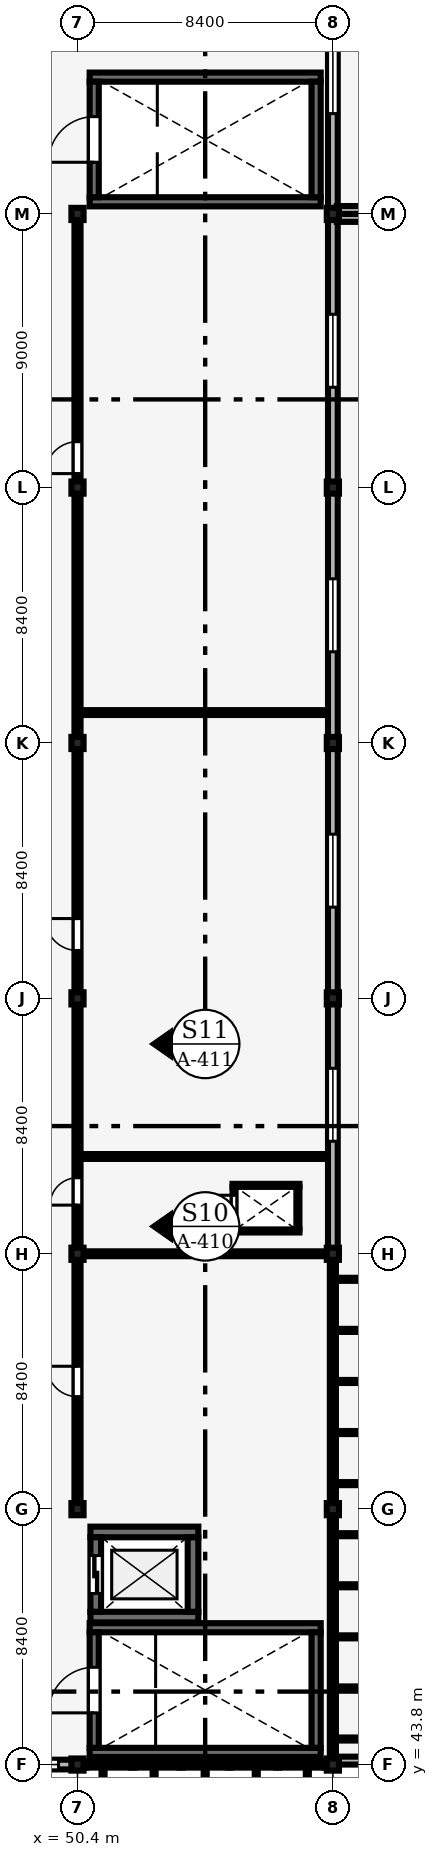
"""IFC4 building model, lengths in metres.
Left out: names, types, materials, properties, quantities, classifications, styles, units other than length and angle.
Written with IfcOpenShell. Run it as: python <this file> out.ifc"""

import sys

from ifc_helpers import new_model, si_unit, direction, frame, frame_2d, origin, origin_2d, place, context, subcontext, project, spatial, rectangle, extrude, element, fill, save


model = new_model("IFC4")
c1 = context("Model", 3, precision=1e-05, world=origin(), true_north=direction((0.0, 1.0)))
c2 = subcontext(c1, "Body", "Model", "MODEL_VIEW")
j1 = project(units=[si_unit("LENGTHUNIT", "METRE"), si_unit("PLANEANGLEUNIT", "RADIAN")], contexts=[c1])
p1 = place(None, origin())
s1 = spatial("IfcSite", under=j1, at=p1, CompositionType="ELEMENT")
p2 = place(p1, origin())
s2 = spatial("IfcBuilding", under=s1, at=p2, CompositionType="ELEMENT")
p3 = place(p2, frame((0.0, 0.0, 21.6)))
s3 = spatial("IfcBuildingStorey", under=s2, at=p3, CompositionType="ELEMENT", Elevation=21.6)
for number, where, z_axis, x_axis in (
    (1, (50.4, 43.8, 0.0), (0.0, 0.0, 1.0), (1.0, 0.0, 0.0)),
    (2, (50.4, 52.2, 0.0), (0.0, 0.0, 1.0), (1.0, 0.0, 0.0)),
    (3, (50.4, 60.6, 0.0), (0.0, 0.0, 1.0), (1.0, 0.0, 0.0)),
    (4, (50.4, 69.0, 0.0), (0.0, 0.0, 1.0), (1.0, 0.0, 0.0)),
    (5, (50.4, 77.4, 0.0), (0.0, 0.0, 1.0), (1.0, 0.0, 0.0)),
    (6, (50.4, 85.8, 0.0), (0.0, 0.0, 1.0), (1.0, 0.0, 0.0)),
    (7, (50.4, 94.8, 0.0), (0.0, 0.0, 1.0), (1.0, 0.0, 0.0)),
    (8, (58.8, 43.8, 0.0), (0.0, 0.0, 1.0), (1.0, 0.0, 0.0)),
    (9, (58.8, 52.2, 0.0), (0.0, 0.0, 1.0), (1.0, 0.0, 0.0)),
    (10, (58.8, 60.6, 0.0), (0.0, 0.0, 1.0), (1.0, 0.0, 0.0)),
    (11, (58.8, 69.0, 0.0), (0.0, 0.0, 1.0), (1.0, 0.0, 0.0)),
    (12, (58.8, 77.4, 0.0), (0.0, 0.0, 1.0), (1.0, 0.0, 0.0)),
    (13, (58.8, 85.8, 0.0), (0.0, 0.0, 1.0), (1.0, 0.0, 0.0)),
    (14, (58.8, 94.8, 0.0), (0.0, 0.0, 1.0), (1.0, 0.0, 0.0)),
):
    element("IfcColumn", number, at=place(p3, frame(where, z_axis=z_axis, x_axis=x_axis)), inside=s3, PredefinedType="COLUMN", context=c2, shape_type="SweptSolid", body=[
        extrude(rectangle(XDim=0.4, YDim=0.4, at=origin_2d()), origin(), (0.0, 0.0, 1.0), 4.2),
    ])
p4 = place(p3, frame((42.175, 43.8, 0.0), z_axis=(0.0, 0.0, 1.0), x_axis=(1.0, 0.0, 0.0)))
e15 = element("IfcWall", 15, at=p4, inside=s3, PredefinedType="SOLIDWALL", context=c2, shape_type="SweptSolid", body=[
    extrude(rectangle(XDim=8.05, YDim=0.32, at=frame_2d((4.025, 0.0))), origin(), (0.0, 0.0, 1.0), 3.48),
])
p5 = place(p4, frame((0.45, 0.0, 0.9)))
e16 = element("IfcOpeningElement", 16, at=p5, cuts=e15, PredefinedType="OPENING", context=c2, shape_type="SweptSolid", body=[
    extrude(rectangle(XDim=1.2, YDim=1.5, at=frame_2d((0.6, 0.75))), frame((0.0, 0.17, 0.0), z_axis=(0.0, -1.0, 0.0), x_axis=(1.0, 0.0, 0.0)), (0.0, 0.0, 1.0), 0.34),
])
p6 = place(p4, frame((6.4, 0.0, 0.9)))
e17 = element("IfcOpeningElement", 17, at=p6, cuts=e15, PredefinedType="OPENING", context=c2, shape_type="SweptSolid", body=[
    extrude(rectangle(XDim=1.2, YDim=1.8, at=frame_2d((0.6, 0.9))), frame((0.0, 0.17, 0.0), z_axis=(0.0, -1.0, 0.0), x_axis=(1.0, 0.0, 0.0)), (0.0, 0.0, 1.0), 0.34),
])
p7 = place(p3, frame((58.8, 60.775, 0.0), z_axis=(0.0, 0.0, 1.0), x_axis=(0.0, 1.0, 0.0)))
e18 = element("IfcWall", 18, at=p7, inside=s3, PredefinedType="SOLIDWALL", context=c2, shape_type="SweptSolid", body=[
    extrude(rectangle(XDim=8.05, YDim=0.32, at=frame_2d((4.025, 0.0))), origin(), (0.0, 0.0, 1.0), 3.48),
])
p8 = place(p7, frame((3.525, 0.0, 0.9)))
e19 = element("IfcOpeningElement", 19, at=p8, cuts=e18, PredefinedType="OPENING", context=c2, shape_type="SweptSolid", body=[
    extrude(rectangle(XDim=2.4, YDim=1.8, at=frame_2d((1.2, 0.9))), frame((0.0, 0.17, 0.0), z_axis=(0.0, -1.0, 0.0), x_axis=(1.0, 0.0, 0.0)), (0.0, 0.0, 1.0), 0.34),
])
p9 = place(p3, frame((58.8, 69.175, 0.0), z_axis=(0.0, 0.0, 1.0), x_axis=(0.0, 1.0, 0.0)))
e20 = element("IfcWall", 20, at=p9, inside=s3, PredefinedType="SOLIDWALL", context=c2, shape_type="SweptSolid", body=[
    extrude(rectangle(XDim=8.05, YDim=0.32, at=frame_2d((4.025, 0.0))), origin(), (0.0, 0.0, 1.0), 3.43),
])
p10 = place(p9, frame((2.825, 0.0, 0.9)))
e21 = element("IfcOpeningElement", 21, at=p10, cuts=e20, PredefinedType="OPENING", context=c2, shape_type="SweptSolid", body=[
    extrude(rectangle(XDim=2.4, YDim=1.8, at=frame_2d((1.2, 0.9))), frame((0.0, 0.17, 0.0), z_axis=(0.0, -1.0, 0.0), x_axis=(1.0, 0.0, 0.0)), (0.0, 0.0, 1.0), 0.34),
])
p11 = place(p3, frame((58.8, 77.575, 0.0), z_axis=(0.0, 0.0, 1.0), x_axis=(0.0, 1.0, 0.0)))
e22 = element("IfcWall", 22, at=p11, inside=s3, PredefinedType="SOLIDWALL", context=c2, shape_type="SweptSolid", body=[
    extrude(rectangle(XDim=8.05, YDim=0.32, at=frame_2d((4.025, 0.0))), origin(), (0.0, 0.0, 1.0), 3.48),
])
p12 = place(p11, frame((2.825, 0.0, 0.9)))
e23 = element("IfcOpeningElement", 23, at=p12, cuts=e22, PredefinedType="OPENING", context=c2, shape_type="SweptSolid", body=[
    extrude(rectangle(XDim=2.4, YDim=1.8, at=frame_2d((1.2, 0.9))), frame((0.0, 0.17, 0.0), z_axis=(0.0, -1.0, 0.0), x_axis=(1.0, 0.0, 0.0)), (0.0, 0.0, 1.0), 0.34),
])
p13 = place(p3, frame((58.8, 85.975, 0.0), z_axis=(0.0, 0.0, 1.0), x_axis=(0.0, 1.0, 0.0)))
e24 = element("IfcWall", 24, at=p13, inside=s3, PredefinedType="SOLIDWALL", context=c2, shape_type="SweptSolid", body=[
    extrude(rectangle(XDim=8.65, YDim=0.32, at=frame_2d((4.325, 0.0))), origin(), (0.0, 0.0, 1.0), 3.43),
])
p14 = place(p13, frame((3.125, 0.0, 0.9)))
e25 = element("IfcOpeningElement", 25, at=p14, cuts=e24, PredefinedType="OPENING", context=c2, shape_type="SweptSolid", body=[
    extrude(rectangle(XDim=2.4, YDim=1.8, at=frame_2d((1.2, 0.9))), frame((0.0, 0.17, 0.0), z_axis=(0.0, -1.0, 0.0), x_axis=(1.0, 0.0, 0.0)), (0.0, 0.0, 1.0), 0.34),
])
p15 = place(p3, frame((58.8, 94.975, 0.0), z_axis=(0.0, 0.0, 1.0), x_axis=(0.0, 1.0, 0.0)))
e26 = element("IfcWall", 26, at=p15, inside=s3, PredefinedType="SOLIDWALL", context=c2, shape_type="SweptSolid", body=[
    extrude(rectangle(XDim=8.65, YDim=0.32, at=frame_2d((4.325, 0.0))), origin(), (0.0, 0.0, 1.0), 3.48),
])
p16 = place(p15, frame((3.125, 0.0, 0.9)))
e27 = element("IfcOpeningElement", 27, at=p16, cuts=e26, PredefinedType="OPENING", context=c2, shape_type="SweptSolid", body=[
    extrude(rectangle(XDim=2.4, YDim=1.8, at=frame_2d((1.2, 0.9))), frame((0.0, 0.17, 0.0), z_axis=(0.0, -1.0, 0.0), x_axis=(1.0, 0.0, 0.0)), (0.0, 0.0, 1.0), 0.34),
])
for number, where, z_axis, x_axis in (
    (28, (58.93, 43.93, 0.0), (0.0, 0.0, 1.0), (1.0, 0.0, 0.0)),
    (29, (58.93, 94.67, 0.0), (0.0, 0.0, 1.0), (1.0, 0.0, 0.0)),
):
    element("IfcWall", number, at=place(p3, frame(where, z_axis=z_axis, x_axis=x_axis)), inside=s3, PredefinedType="PARAPET", context=c2, shape_type="SweptSolid", body=[
        extrude(rectangle(XDim=8.14, YDim=0.26, at=frame_2d((4.07, 0.0))), origin(), (0.0, 0.0, 1.0), 0.85),
    ])
p17 = place(p3, frame((58.93, 94.93, 0.0), z_axis=(0.0, 0.0, 1.0), x_axis=(1.0, 0.0, 0.0)))
e30 = element("IfcWall", 30, at=p17, inside=s3, PredefinedType="PARAPET", context=c2, shape_type="SweptSolid", body=[
    extrude(rectangle(XDim=24.94, YDim=0.26, at=frame_2d((12.47, 0.0))), origin(), (0.0, 0.0, 1.0), 0.85),
])
for number, where, z_axis, x_axis in (
    (31, (50.8, 44.2, 0.0), (0.0, 0.0, 1.0), (1.0, 0.0, 0.0)),
    (32, (50.8, 48.3, 0.0), (0.0, 0.0, 1.0), (1.0, 0.0, 0.0)),
):
    element("IfcWall", number, at=place(p3, frame(where, z_axis=z_axis, x_axis=x_axis)), inside=s3, PredefinedType="SHEAR", context=c2, shape_type="SweptSolid", body=[
        extrude(rectangle(XDim=7.6, YDim=0.3, at=frame_2d((3.8, 0.0))), origin(), (0.0, 0.0, 1.0), 4.025),
    ])
p18 = place(p3, frame((50.95, 44.35, 0.0), z_axis=(0.0, 0.0, 1.0), x_axis=(0.0, 1.0, 0.0)))
e33 = element("IfcWall", 33, at=p18, inside=s3, PredefinedType="SHEAR", context=c2, shape_type="SweptSolid", body=[
    extrude(rectangle(XDim=3.8, YDim=0.3, at=frame_2d((1.9, 0.0))), origin(), (0.0, 0.0, 1.0), 4.025),
])
p19 = place(p18, frame((1.15, 0.0, 0.0)))
e34 = element("IfcOpeningElement", 34, at=p19, cuts=e33, PredefinedType="OPENING", context=c2, shape_type="SweptSolid", body=[
    extrude(rectangle(XDim=1.5, YDim=2.2, at=frame_2d((0.75, 1.1))), frame((0.0, 0.16, 0.0), z_axis=(0.0, -1.0, 0.0), x_axis=(1.0, 0.0, 0.0)), (0.0, 0.0, 1.0), 0.32),
])
p20 = place(p3, frame((58.25, 44.35, 0.0), z_axis=(0.0, 0.0, 1.0), x_axis=(0.0, 1.0, 0.0)))
e35 = element("IfcWall", 35, at=p20, inside=s3, PredefinedType="SHEAR", context=c2, shape_type="SweptSolid", body=[
    extrude(rectangle(XDim=3.8, YDim=0.3, at=frame_2d((1.9, 0.0))), origin(), (0.0, 0.0, 1.0), 4.025),
])
for number, where, z_axis, x_axis in (
    (36, (50.825, 48.65, 0.0), (0.0, 0.0, 1.0), (1.0, 0.0, 0.0)),
    (37, (50.825, 51.45, 0.0), (0.0, 0.0, 1.0), (1.0, 0.0, 0.0)),
):
    element("IfcWall", number, at=place(p3, frame(where, z_axis=z_axis, x_axis=x_axis)), inside=s3, PredefinedType="SHEAR", context=c2, shape_type="SweptSolid", body=[
        extrude(rectangle(XDim=3.55, YDim=0.35, at=frame_2d((1.775, 0.0))), origin(), (0.0, 0.0, 1.0), 3.92),
    ])
p21 = place(p3, frame((51.0, 48.825, 0.0), z_axis=(0.0, 0.0, 1.0), x_axis=(0.0, 1.0, 0.0)))
e38 = element("IfcWall", 38, at=p21, inside=s3, PredefinedType="SHEAR", context=c2, shape_type="SweptSolid", body=[
    extrude(rectangle(XDim=2.45, YDim=0.35, at=frame_2d((1.225, 0.0))), origin(), (0.0, 0.0, 1.0), 3.92),
])
p22 = place(p21, frame((0.6, 0.0, 0.0)))
e39 = element("IfcOpeningElement", 39, at=p22, cuts=e38, PredefinedType="OPENING", context=c2, shape_type="SweptSolid", body=[
    extrude(rectangle(XDim=1.25, YDim=2.25, at=frame_2d((0.625, 1.125))), frame((0.0, 0.185, 0.0), z_axis=(0.0, -1.0, 0.0), x_axis=(1.0, 0.0, 0.0)), (0.0, 0.0, 1.0), 0.37),
])
p23 = place(p3, frame((54.2, 48.825, 0.0), z_axis=(0.0, 0.0, 1.0), x_axis=(0.0, 1.0, 0.0)))
e40 = element("IfcWall", 40, at=p23, inside=s3, PredefinedType="SHEAR", context=c2, shape_type="SweptSolid", body=[
    extrude(rectangle(XDim=2.45, YDim=0.35, at=frame_2d((1.225, 0.0))), origin(), (0.0, 0.0, 1.0), 3.92),
])
for number, where, z_axis, x_axis in (
    (41, (50.8, 95.2, 0.0), (0.0, 0.0, 1.0), (1.0, 0.0, 0.0)),
    (42, (50.8, 99.3, 0.0), (0.0, 0.0, 1.0), (1.0, 0.0, 0.0)),
):
    element("IfcWall", number, at=place(p3, frame(where, z_axis=z_axis, x_axis=x_axis)), inside=s3, PredefinedType="SHEAR", context=c2, shape_type="SweptSolid", body=[
        extrude(rectangle(XDim=7.6, YDim=0.3, at=frame_2d((3.8, 0.0))), origin(), (0.0, 0.0, 1.0), 4.025),
    ])
p24 = place(p3, frame((50.95, 95.35, 0.0), z_axis=(0.0, 0.0, 1.0), x_axis=(0.0, 1.0, 0.0)))
e43 = element("IfcWall", 43, at=p24, inside=s3, PredefinedType="SHEAR", context=c2, shape_type="SweptSolid", body=[
    extrude(rectangle(XDim=3.8, YDim=0.3, at=frame_2d((1.9, 0.0))), origin(), (0.0, 0.0, 1.0), 4.025),
])
p25 = place(p24, frame((1.15, 0.0, 0.0)))
e44 = element("IfcOpeningElement", 44, at=p25, cuts=e43, PredefinedType="OPENING", context=c2, shape_type="SweptSolid", body=[
    extrude(rectangle(XDim=1.5, YDim=2.2, at=frame_2d((0.75, 1.1))), frame((0.0, 0.16, 0.0), z_axis=(0.0, -1.0, 0.0), x_axis=(1.0, 0.0, 0.0)), (0.0, 0.0, 1.0), 0.32),
])
p26 = place(p3, frame((58.25, 95.35, 0.0), z_axis=(0.0, 0.0, 1.0), x_axis=(0.0, 1.0, 0.0)))
e45 = element("IfcWall", 45, at=p26, inside=s3, PredefinedType="SHEAR", context=c2, shape_type="SweptSolid", body=[
    extrude(rectangle(XDim=3.8, YDim=0.3, at=frame_2d((1.9, 0.0))), origin(), (0.0, 0.0, 1.0), 4.025),
])
for number, where, z_axis, x_axis in (
    (46, (55.5, 61.35, 0.0), (0.0, 0.0, 1.0), (1.0, 0.0, 0.0)),
    (47, (55.5, 62.85, 0.0), (0.0, 0.0, 1.0), (1.0, 0.0, 0.0)),
):
    element("IfcWall", number, at=place(p3, frame(where, z_axis=z_axis, x_axis=x_axis)), inside=s3, PredefinedType="PARTITIONING", context=c2, shape_type="SweptSolid", body=[
        extrude(rectangle(XDim=2.2, YDim=0.1, at=frame_2d((1.1, 0.0))), origin(), (0.0, 0.0, 1.0), 3.9),
    ])
p27 = place(p3, frame((55.55, 61.4, 0.0), z_axis=(0.0, 0.0, 1.0), x_axis=(0.0, 1.0, 0.0)))
e48 = element("IfcWall", 48, at=p27, inside=s3, PredefinedType="PARTITIONING", context=c2, shape_type="SweptSolid", body=[
    extrude(rectangle(XDim=1.4, YDim=0.1, at=frame_2d((0.7, 0.0))), origin(), (0.0, 0.0, 1.0), 3.9),
])
p28 = place(p27, frame((0.275, 0.0, 0.0)))
e49 = element("IfcOpeningElement", 49, at=p28, cuts=e48, PredefinedType="OPENING", context=c2, shape_type="SweptSolid", body=[
    extrude(rectangle(XDim=0.85, YDim=2.05, at=frame_2d((0.425, 1.025))), frame((0.0, 0.06, 0.0), z_axis=(0.0, -1.0, 0.0), x_axis=(1.0, 0.0, 0.0)), (0.0, 0.0, 1.0), 0.12),
])
p29 = place(p3, frame((57.65, 61.4, 0.0), z_axis=(0.0, 0.0, 1.0), x_axis=(0.0, 1.0, 0.0)))
e50 = element("IfcWall", 50, at=p29, inside=s3, PredefinedType="PARTITIONING", context=c2, shape_type="SweptSolid", body=[
    extrude(rectangle(XDim=1.4, YDim=0.1, at=frame_2d((0.7, 0.0))), origin(), (0.0, 0.0, 1.0), 3.9),
])
p30 = place(p3, frame((50.505, 60.6, 0.0), z_axis=(0.0, 0.0, 1.0), x_axis=(1.0, 0.0, 0.0)))
e51 = element("IfcWall", 51, at=p30, inside=s3, PredefinedType="PARTITIONING", context=c2, shape_type="SweptSolid", body=[
    extrude(rectangle(XDim=8.19, YDim=0.16, at=frame_2d((4.095, 0.0))), origin(), (0.0, 0.0, 1.0), 3.43),
])
p31 = place(p3, frame((50.505, 63.8, 0.0), z_axis=(0.0, 0.0, 1.0), x_axis=(1.0, 0.0, 0.0)))
e52 = element("IfcWall", 52, at=p31, inside=s3, PredefinedType="PARTITIONING", context=c2, shape_type="SweptSolid", body=[
    extrude(rectangle(XDim=8.13, YDim=0.16, at=frame_2d((4.065, 0.0))), origin(), (0.0, 0.0, 1.0), 3.451),
])
p32 = place(p3, frame((50.505, 78.4, 0.0), z_axis=(0.0, 0.0, 1.0), x_axis=(1.0, 0.0, 0.0)))
e53 = element("IfcWall", 53, at=p32, inside=s3, PredefinedType="PARTITIONING", context=c2, shape_type="SweptSolid", body=[
    extrude(rectangle(XDim=8.13, YDim=0.16, at=frame_2d((4.065, 0.0))), origin(), (0.0, 0.0, 1.0), 3.9),
])
p33 = place(p3, frame((50.4, 52.41, 0.0), z_axis=(0.0, 0.0, 1.0), x_axis=(0.0, 1.0, 0.0)))
e54 = element("IfcWall", 54, at=p33, inside=s3, PredefinedType="PARTITIONING", context=c2, shape_type="SweptSolid", body=[
    extrude(rectangle(XDim=7.98, YDim=0.2, at=frame_2d((3.99, 0.0))), origin(), (0.0, 0.0, 1.0), 3.48),
])
p34 = place(p33, frame((3.49, 0.0, 0.0)))
e55 = element("IfcOpeningElement", 55, at=p34, cuts=e54, PredefinedType="OPENING", context=c2, shape_type="SweptSolid", body=[
    extrude(rectangle(XDim=1.0, YDim=2.15, at=frame_2d((0.5, 1.075))), frame((0.0, 0.11, 0.0), z_axis=(0.0, -1.0, 0.0), x_axis=(1.0, 0.0, 0.0)), (0.0, 0.0, 1.0), 0.22),
])
p35 = place(p3, frame((50.4, 60.81, 0.0), z_axis=(0.0, 0.0, 1.0), x_axis=(0.0, 1.0, 0.0)))
e56 = element("IfcWall", 56, at=p35, inside=s3, PredefinedType="PARTITIONING", context=c2, shape_type="SweptSolid", body=[
    extrude(rectangle(XDim=7.98, YDim=0.2, at=frame_2d((3.99, 0.0))), origin(), (0.0, 0.0, 1.0), 3.43),
])
p36 = place(p35, frame((1.39, 0.0, 0.0)))
e57 = element("IfcOpeningElement", 57, at=p36, cuts=e56, PredefinedType="OPENING", context=c2, shape_type="SweptSolid", body=[
    extrude(rectangle(XDim=0.9, YDim=2.1, at=frame_2d((0.45, 1.05))), frame((0.0, 0.11, 0.0), z_axis=(0.0, -1.0, 0.0), x_axis=(1.0, 0.0, 0.0)), (0.0, 0.0, 1.0), 0.22),
])
p37 = place(p3, frame((50.4, 69.21, 0.0), z_axis=(0.0, 0.0, 1.0), x_axis=(0.0, 1.0, 0.0)))
e58 = element("IfcWall", 58, at=p37, inside=s3, PredefinedType="PARTITIONING", context=c2, shape_type="SweptSolid", body=[
    extrude(rectangle(XDim=7.98, YDim=0.2, at=frame_2d((3.99, 0.0))), origin(), (0.0, 0.0, 1.0), 3.48),
])
p38 = place(p37, frame((1.365, 0.0, 0.0)))
e59 = element("IfcOpeningElement", 59, at=p38, cuts=e58, PredefinedType="OPENING", context=c2, shape_type="SweptSolid", body=[
    extrude(rectangle(XDim=1.05, YDim=2.2, at=frame_2d((0.525, 1.1))), frame((0.0, 0.11, 0.0), z_axis=(0.0, -1.0, 0.0), x_axis=(1.0, 0.0, 0.0)), (0.0, 0.0, 1.0), 0.22),
])
p39 = place(p3, frame((50.4, 77.61, 0.0), z_axis=(0.0, 0.0, 1.0), x_axis=(0.0, 1.0, 0.0)))
e60 = element("IfcWall", 60, at=p39, inside=s3, PredefinedType="PARTITIONING", context=c2, shape_type="SweptSolid", body=[
    extrude(rectangle(XDim=7.98, YDim=0.2, at=frame_2d((3.99, 0.0))), origin(), (0.0, 0.0, 1.0), 3.43),
])
p40 = place(p3, frame((50.4, 86.01, 0.0), z_axis=(0.0, 0.0, 1.0), x_axis=(0.0, 1.0, 0.0)))
e61 = element("IfcWall", 61, at=p40, inside=s3, PredefinedType="PARTITIONING", context=c2, shape_type="SweptSolid", body=[
    extrude(rectangle(XDim=8.58, YDim=0.2, at=frame_2d((4.29, 0.0))), origin(), (0.0, 0.0, 1.0), 3.48),
])
p41 = place(p40, frame((0.25, 0.0, 0.0)))
e62 = element("IfcOpeningElement", 62, at=p41, cuts=e61, PredefinedType="OPENING", context=c2, shape_type="SweptSolid", body=[
    extrude(rectangle(XDim=1.05, YDim=2.2, at=frame_2d((0.525, 1.1))), frame((0.0, 0.11, 0.0), z_axis=(0.0, -1.0, 0.0), x_axis=(1.0, 0.0, 0.0)), (0.0, 0.0, 1.0), 0.22),
])
p42 = place(p6, origin())
e63 = element("IfcWindow", 63, at=p42, inside=s3, PartitioningType="SINGLE_PANEL", PredefinedType="WINDOW", context=c2, shape_type="SweptSolid", body=[
    extrude(rectangle(XDim=1.2, YDim=1.8, at=frame_2d((0.6, 0.9))), frame((0.0, 0.03, 0.0), z_axis=(0.0, -1.0, 0.0), x_axis=(1.0, 0.0, 0.0)), (0.0, 0.0, 1.0), 0.06),
])
fill(e17, e63)
p43 = place(p8, origin())
e64 = element("IfcWindow", 64, at=p43, inside=s3, PartitioningType="SINGLE_PANEL", PredefinedType="WINDOW", context=c2, shape_type="SweptSolid", body=[
    extrude(rectangle(XDim=2.4, YDim=1.8, at=frame_2d((1.2, 0.9))), frame((0.0, 0.03, 0.0), z_axis=(0.0, -1.0, 0.0), x_axis=(1.0, 0.0, 0.0)), (0.0, 0.0, 1.0), 0.06),
])
fill(e19, e64)
p44 = place(p10, origin())
e65 = element("IfcWindow", 65, at=p44, inside=s3, PartitioningType="SINGLE_PANEL", PredefinedType="WINDOW", context=c2, shape_type="SweptSolid", body=[
    extrude(rectangle(XDim=2.4, YDim=1.8, at=frame_2d((1.2, 0.9))), frame((0.0, 0.03, 0.0), z_axis=(0.0, -1.0, 0.0), x_axis=(1.0, 0.0, 0.0)), (0.0, 0.0, 1.0), 0.06),
])
fill(e21, e65)
p45 = place(p12, origin())
e66 = element("IfcWindow", 66, at=p45, inside=s3, PartitioningType="SINGLE_PANEL", PredefinedType="WINDOW", context=c2, shape_type="SweptSolid", body=[
    extrude(rectangle(XDim=2.4, YDim=1.8, at=frame_2d((1.2, 0.9))), frame((0.0, 0.03, 0.0), z_axis=(0.0, -1.0, 0.0), x_axis=(1.0, 0.0, 0.0)), (0.0, 0.0, 1.0), 0.06),
])
fill(e23, e66)
p46 = place(p14, origin())
e67 = element("IfcWindow", 67, at=p46, inside=s3, PartitioningType="SINGLE_PANEL", PredefinedType="WINDOW", context=c2, shape_type="SweptSolid", body=[
    extrude(rectangle(XDim=2.4, YDim=1.8, at=frame_2d((1.2, 0.9))), frame((0.0, 0.03, 0.0), z_axis=(0.0, -1.0, 0.0), x_axis=(1.0, 0.0, 0.0)), (0.0, 0.0, 1.0), 0.06),
])
fill(e25, e67)
p47 = place(p16, origin())
e68 = element("IfcWindow", 68, at=p47, inside=s3, PartitioningType="SINGLE_PANEL", PredefinedType="WINDOW", context=c2, shape_type="SweptSolid", body=[
    extrude(rectangle(XDim=2.4, YDim=1.8, at=frame_2d((1.2, 0.9))), frame((0.0, 0.03, 0.0), z_axis=(0.0, -1.0, 0.0), x_axis=(1.0, 0.0, 0.0)), (0.0, 0.0, 1.0), 0.06),
])
fill(e27, e68)
p48 = place(p19, origin())
e69 = element("IfcDoor", 69, at=p48, inside=s3, OperationType="DOUBLE_DOOR_SINGLE_SWING", PredefinedType="DOOR", context=c2, shape_type="SweptSolid", body=[
    extrude(rectangle(XDim=1.5, YDim=2.2, at=frame_2d((0.75, 1.1))), frame((0.0, 0.025, 0.0), z_axis=(0.0, -1.0, 0.0), x_axis=(1.0, 0.0, 0.0)), (0.0, 0.0, 1.0), 0.05),
])
fill(e34, e69)
p49 = place(p22, origin())
e70 = element("IfcDoor", 70, at=p49, inside=s3, OperationType="DOUBLE_DOOR_SLIDING", PredefinedType="DOOR", context=c2, shape_type="SweptSolid", body=[
    extrude(rectangle(XDim=1.25, YDim=2.25, at=frame_2d((0.625, 1.125))), frame((0.0, 0.025, 0.0), z_axis=(0.0, -1.0, 0.0), x_axis=(1.0, 0.0, 0.0)), (0.0, 0.0, 1.0), 0.05),
])
fill(e39, e70)
p50 = place(p25, origin())
e71 = element("IfcDoor", 71, at=p50, inside=s3, OperationType="DOUBLE_DOOR_SINGLE_SWING", PredefinedType="DOOR", context=c2, shape_type="SweptSolid", body=[
    extrude(rectangle(XDim=1.5, YDim=2.2, at=frame_2d((0.75, 1.1))), frame((0.0, 0.025, 0.0), z_axis=(0.0, -1.0, 0.0), x_axis=(1.0, 0.0, 0.0)), (0.0, 0.0, 1.0), 0.05),
])
fill(e44, e71)
p51 = place(p28, origin())
e72 = element("IfcDoor", 72, at=p51, inside=s3, OperationType="SINGLE_SWING_RIGHT", PredefinedType="DOOR", context=c2, shape_type="SweptSolid", body=[
    extrude(rectangle(XDim=0.85, YDim=2.05, at=frame_2d((0.425, 1.025))), frame((0.0, 0.025, 0.0), z_axis=(0.0, -1.0, 0.0), x_axis=(1.0, 0.0, 0.0)), (0.0, 0.0, 1.0), 0.05),
])
fill(e49, e72)
p52 = place(p34, origin())
e73 = element("IfcDoor", 73, at=p52, inside=s3, OperationType="SINGLE_SWING_RIGHT", PredefinedType="DOOR", context=c2, shape_type="SweptSolid", body=[
    extrude(rectangle(XDim=1.0, YDim=2.15, at=frame_2d((0.5, 1.075))), frame((0.0, 0.025, 0.0), z_axis=(0.0, -1.0, 0.0), x_axis=(1.0, 0.0, 0.0)), (0.0, 0.0, 1.0), 0.05),
])
fill(e55, e73)
p53 = place(p36, origin())
e74 = element("IfcDoor", 74, at=p53, inside=s3, OperationType="SINGLE_SWING_LEFT", PredefinedType="DOOR", context=c2, shape_type="SweptSolid", body=[
    extrude(rectangle(XDim=0.9, YDim=2.1, at=frame_2d((0.45, 1.05))), frame((0.0, 0.025, 0.0), z_axis=(0.0, -1.0, 0.0), x_axis=(1.0, 0.0, 0.0)), (0.0, 0.0, 1.0), 0.05),
])
fill(e57, e74)
p54 = place(p38, origin())
e75 = element("IfcDoor", 75, at=p54, inside=s3, OperationType="SINGLE_SWING_RIGHT", PredefinedType="DOOR", context=c2, shape_type="SweptSolid", body=[
    extrude(rectangle(XDim=1.05, YDim=2.2, at=frame_2d((0.525, 1.1))), frame((0.0, 0.025, 0.0), z_axis=(0.0, -1.0, 0.0), x_axis=(1.0, 0.0, 0.0)), (0.0, 0.0, 1.0), 0.05),
])
fill(e59, e75)
p55 = place(p41, origin())
e76 = element("IfcDoor", 76, at=p55, inside=s3, OperationType="SINGLE_SWING_LEFT", PredefinedType="DOOR", context=c2, shape_type="SweptSolid", body=[
    extrude(rectangle(XDim=1.05, YDim=2.2, at=frame_2d((0.525, 1.1))), frame((0.0, 0.025, 0.0), z_axis=(0.0, -1.0, 0.0), x_axis=(1.0, 0.0, 0.0)), (0.0, 0.0, 1.0), 0.05),
])
fill(e62, e76)
save(model, sys.argv[1])
